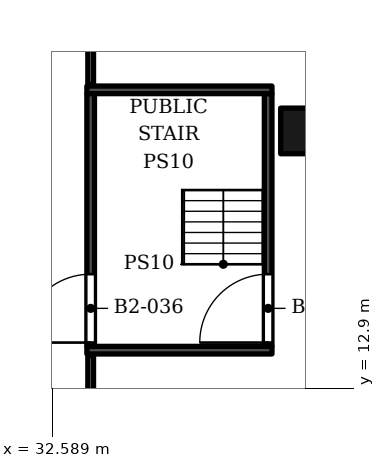
"""IFC4 building model, lengths in metres.
Left out: names, types, materials, properties, quantities, classifications, styles, units other than length and angle.
Written with IfcOpenShell. Run it as: python <this file> out.ifc"""

import sys

from ifc_helpers import new_model, si_unit, direction, frame, frame_2d, origin, origin_2d, place, context, subcontext, project, spatial, rectangle, extrude, element, fill, save


model = new_model("IFC4")
c1 = context("Model", 3, precision=1e-05, world=origin(), true_north=direction((0.0, 1.0)))
c2 = subcontext(c1, "Body", "Model", "MODEL_VIEW")
j1 = project(units=[si_unit("LENGTHUNIT", "METRE"), si_unit("PLANEANGLEUNIT", "RADIAN")], contexts=[c1])
p1 = place(None, origin())
s1 = spatial("IfcSite", under=j1, at=p1, CompositionType="ELEMENT")
p2 = place(p1, origin())
s2 = spatial("IfcBuilding", under=s1, at=p2, CompositionType="ELEMENT")
p3 = place(p2, frame((0.0, 0.0, -10.0)))
s3 = spatial("IfcBuildingStorey", under=s2, at=p3, CompositionType="ELEMENT", Elevation=-10.0)
p4 = place(p3, frame((39.2, 19.669, -1.6), z_axis=(0.0, 0.0, 1.0), x_axis=(1.0, 0.0, 0.0)))
e1 = element("IfcColumn", 1, at=p4, inside=s3, PredefinedType="COLUMN", context=c2, shape_type="SweptSolid", body=[
    extrude(rectangle(XDim=1.2, YDim=1.2, at=origin_2d()), origin(), (0.0, 0.0, 1.0), 6.6),
])
for number, where, z_axis, x_axis in (
    (2, (33.5, 13.9, 0.0), (0.0, 0.0, 1.0), (1.0, 0.0, 0.0)),
    (3, (33.5, 20.75, 0.0), (0.0, 0.0, 1.0), (1.0, 0.0, 0.0)),
):
    element("IfcWall", number, at=place(p3, frame(where, z_axis=z_axis, x_axis=x_axis)), inside=s3, PredefinedType="SOLIDWALL", context=c2, shape_type="SweptSolid", body=[
        extrude(rectangle(XDim=4.87, YDim=0.2, at=frame_2d((2.435, 0.0))), origin(), (0.0, 0.0, 1.0), 4.5),
    ])
p5 = place(p3, frame((33.6, 14.0, 0.0), z_axis=(0.0, 0.0, 1.0), x_axis=(0.0, 1.0, 0.0)))
e4 = element("IfcWall", 4, at=p5, inside=s3, PredefinedType="SOLIDWALL", context=c2, shape_type="SweptSolid", body=[
    extrude(rectangle(XDim=6.65, YDim=0.2, at=frame_2d((3.325, 0.0))), origin(), (0.0, 0.0, 1.0), 4.5),
])
p6 = place(p5, frame((0.1, 0.0, 0.0)))
e5 = element("IfcOpeningElement", 5, at=p6, cuts=e4, PredefinedType="OPENING", context=c2, shape_type="SweptSolid", body=[
    extrude(rectangle(XDim=1.8, YDim=2.4, at=frame_2d((0.9, 1.2))), frame((0.0, 0.11, 0.0), z_axis=(0.0, -1.0, 0.0), x_axis=(1.0, 0.0, 0.0)), (0.0, 0.0, 1.0), 0.22),
])
p7 = place(p3, frame((38.27, 14.0, 0.0), z_axis=(0.0, 0.0, 1.0), x_axis=(0.0, 1.0, 0.0)))
e6 = element("IfcWall", 6, at=p7, inside=s3, PredefinedType="SOLIDWALL", context=c2, shape_type="SweptSolid", body=[
    extrude(rectangle(XDim=6.65, YDim=0.2, at=frame_2d((3.325, 0.0))), origin(), (0.0, 0.0, 1.0), 4.5),
])
p8 = place(p7, frame((0.1, 0.0, 0.0)))
e7 = element("IfcOpeningElement", 7, at=p8, cuts=e6, PredefinedType="OPENING", context=c2, shape_type="SweptSolid", body=[
    extrude(rectangle(XDim=1.8, YDim=2.4, at=frame_2d((0.9, 1.2))), frame((0.0, 0.11, 0.0), z_axis=(0.0, -1.0, 0.0), x_axis=(1.0, 0.0, 0.0)), (0.0, 0.0, 1.0), 0.22),
])
p9 = place(p3, frame((33.6, 4.69, 0.0), z_axis=(0.0, 0.0, 1.0), x_axis=(0.0, 1.0, 0.0)))
e8 = element("IfcWall", 8, at=p9, inside=s3, PredefinedType="PARTITIONING", context=c2, shape_type="SweptSolid", body=[
    extrude(rectangle(XDim=9.07, YDim=0.15, at=frame_2d((4.535, 0.0))), origin(), (0.0, 0.0, 1.0), 3.3),
])
p10 = place(p9, frame((5.859, 0.0, 0.0)))
e9 = element("IfcOpeningElement", 9, at=p10, cuts=e8, PredefinedType="OPENING", context=c2, shape_type="SweptSolid", body=[
    extrude(rectangle(XDim=1.0, YDim=2.1, at=frame_2d((0.5, 1.05))), frame((0.0, 0.085, 0.0), z_axis=(0.0, -1.0, 0.0), x_axis=(1.0, 0.0, 0.0)), (0.0, 0.0, 1.0), 0.17),
])
p11 = place(p3, frame((33.6, 20.89, 0.0), z_axis=(0.0, 0.0, 1.0), x_axis=(0.0, 1.0, 0.0)))
e10 = element("IfcWall", 10, at=p11, inside=s3, PredefinedType="PARTITIONING", context=c2, shape_type="SweptSolid", body=[
    extrude(rectangle(XDim=3.885, YDim=0.15, at=frame_2d((1.942, 0.0))), origin(), (0.0, 0.0, 1.0), 4.5),
])
p12 = place(p6, origin())
e11 = element("IfcDoor", 11, at=p12, inside=s3, OperationType="DOUBLE_DOOR_SINGLE_SWING", PredefinedType="DOOR", context=c2, shape_type="SweptSolid", body=[
    extrude(rectangle(XDim=1.8, YDim=2.4, at=frame_2d((0.9, 1.2))), frame((0.0, 0.025, 0.0), z_axis=(0.0, -1.0, 0.0), x_axis=(1.0, 0.0, 0.0)), (0.0, 0.0, 1.0), 0.05),
])
fill(e5, e11)
p13 = place(p8, origin())
e12 = element("IfcDoor", 12, at=p13, inside=s3, OperationType="DOUBLE_DOOR_SINGLE_SWING", PredefinedType="DOOR", context=c2, shape_type="SweptSolid", body=[
    extrude(rectangle(XDim=1.8, YDim=2.4, at=frame_2d((0.9, 1.2))), frame((0.0, 0.025, 0.0), z_axis=(0.0, -1.0, 0.0), x_axis=(1.0, 0.0, 0.0)), (0.0, 0.0, 1.0), 0.05),
])
fill(e7, e12)
save(model, sys.argv[1])
